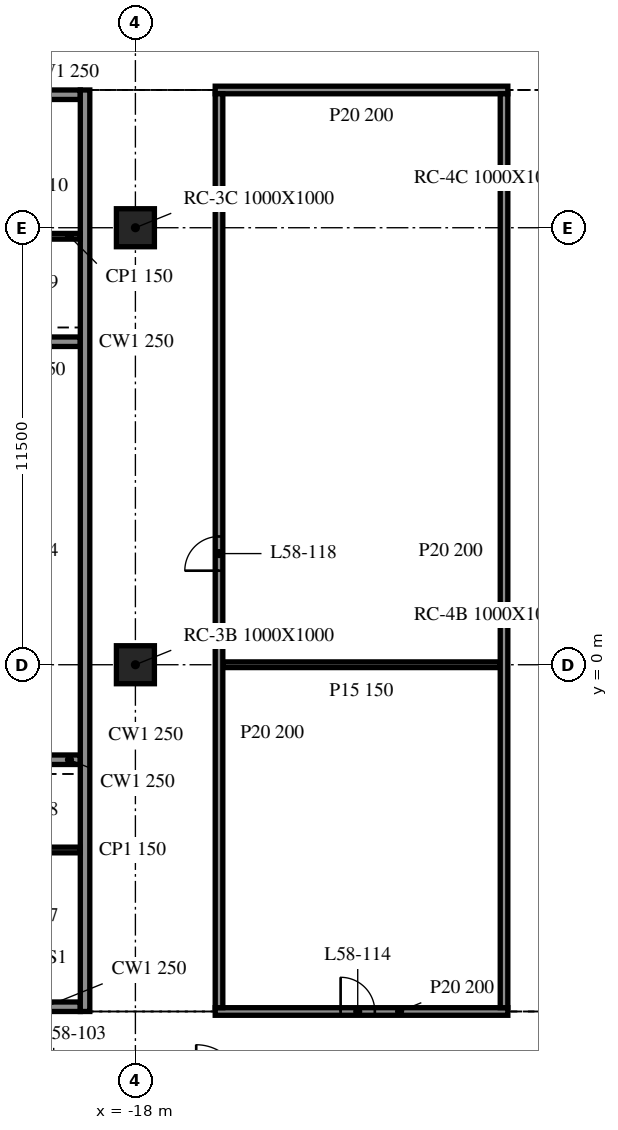
"""IFC4 building model, lengths in metres.
Left out: names, types, materials, properties, quantities, classifications, styles, units other than length and angle.
Written with IfcOpenShell. Run it as: python <this file> out.ifc"""

import sys

from ifc_helpers import new_model, si_unit, direction, frame, frame_2d, origin, origin_2d, place, context, subcontext, project, spatial, rectangle, extrude, element, fill, save


model = new_model("IFC4")
c1 = context("Model", 3, precision=1e-05, world=origin(), true_north=direction((0.0, 1.0)))
c2 = subcontext(c1, "Body", "Model", "MODEL_VIEW")
j1 = project(units=[si_unit("LENGTHUNIT", "METRE"), si_unit("PLANEANGLEUNIT", "RADIAN")], contexts=[c1])
p1 = place(None, origin())
s1 = spatial("IfcSite", under=j1, at=p1, CompositionType="ELEMENT")
p2 = place(p1, origin())
s2 = spatial("IfcBuilding", under=s1, at=p2, CompositionType="ELEMENT")
p3 = place(p2, frame((0.0, 0.0, 240.0)))
s3 = spatial("IfcBuildingStorey", under=s2, at=p3, CompositionType="ELEMENT", Elevation=240.0)
for number, where, z_axis, x_axis in (
    (1, (-18.0, 0.0, -0.34), (0.0, 0.0, 1.0), (1.0, 0.0, 0.0)),
    (2, (-18.0, 11.5, -0.34), (0.0, 0.0, 1.0), (1.0, 0.0, 0.0)),
):
    element("IfcColumn", number, at=place(p3, frame(where, z_axis=z_axis, x_axis=x_axis)), inside=s3, PredefinedType="COLUMN", context=c2, shape_type="SweptSolid", body=[
        extrude(rectangle(XDim=1.0, YDim=1.0, at=origin_2d()), origin(), (0.0, 0.0, 1.0), 3.8),
    ])
p4 = place(p3, frame((-19.325, -9.125, 0.0), z_axis=(0.0, 0.0, 1.0), x_axis=(0.0, 1.0, 0.0)))
e3 = element("IfcWall", 3, at=p4, inside=s3, PredefinedType="SOLIDWALL", context=c2, shape_type="SweptSolid", body=[
    extrude(rectangle(XDim=24.25, YDim=0.25, at=frame_2d((12.125, 0.0))), origin(), (0.0, 0.0, 1.0), 3.46),
])
p5 = place(p3, frame((-19.45, -9.0, 0.0), z_axis=(0.0, 0.0, 1.0), x_axis=(-1.0, 0.0, 0.0)))
e4 = element("IfcWall", 4, at=p5, inside=s3, PredefinedType="SOLIDWALL", context=c2, shape_type="SweptSolid", body=[
    extrude(rectangle(XDim=9.1, YDim=0.25, at=frame_2d((4.55, 0.0))), origin(), (0.0, 0.0, 1.0), 3.46),
])
p6 = place(p5, frame((3.65, 0.0, 0.0)))
e5 = element("IfcOpeningElement", 5, at=p6, cuts=e4, PredefinedType="OPENING", context=c2, shape_type="SweptSolid", body=[
    extrude(rectangle(XDim=1.8, YDim=2.1, at=frame_2d((0.9, 1.05))), frame((0.0, 0.135, 0.0), z_axis=(0.0, -1.0, 0.0), x_axis=(1.0, 0.0, 0.0)), (0.0, 0.0, 1.0), 0.27),
])
p7 = place(p3, frame((-28.55, 15.0, 0.0), z_axis=(0.0, 0.0, 1.0), x_axis=(1.0, 0.0, 0.0)))
e6 = element("IfcWall", 6, at=p7, inside=s3, PredefinedType="SOLIDWALL", context=c2, shape_type="SweptSolid", body=[
    extrude(rectangle(XDim=9.1, YDim=0.25, at=frame_2d((4.55, 0.0))), origin(), (0.0, 0.0, 1.0), 3.46),
])
p8 = place(p7, frame((3.65, 0.0, 0.0)))
e7 = element("IfcOpeningElement", 7, at=p8, cuts=e6, PredefinedType="OPENING", context=c2, shape_type="SweptSolid", body=[
    extrude(rectangle(XDim=1.8, YDim=2.1, at=frame_2d((0.9, 1.05))), frame((0.0, 0.135, 0.0), z_axis=(0.0, -1.0, 0.0), x_axis=(1.0, 0.0, 0.0)), (0.0, 0.0, 1.0), 0.27),
])
for number, where, z_axis, x_axis in (
    (8, (-22.3, -2.5, 0.0), (0.0, 0.0, 1.0), (1.0, 0.0, 0.0)),
    (9, (-22.3, 8.5, 0.0), (0.0, 0.0, 1.0), (1.0, 0.0, 0.0)),
):
    element("IfcWall", number, at=place(p3, frame(where, z_axis=z_axis, x_axis=x_axis)), inside=s3, PredefinedType="SOLIDWALL", context=c2, shape_type="SweptSolid", body=[
        extrude(rectangle(XDim=2.85, YDim=0.25, at=frame_2d((1.425, 0.0))), origin(), (0.0, 0.0, 1.0), 3.46),
    ])
for number, where, z_axis, x_axis in (
    (10, (-22.3, -4.875, 0.0), (0.0, 0.0, 1.0), (1.0, 0.0, 0.0)),
    (11, (-22.3, 11.275, 0.0), (0.0, 0.0, 1.0), (1.0, 0.0, 0.0)),
):
    element("IfcWall", number, at=place(p3, frame(where, z_axis=z_axis, x_axis=x_axis)), inside=s3, PredefinedType="PARTITIONING", context=c2, shape_type="SweptSolid", body=[
        extrude(rectangle(XDim=2.85, YDim=0.15, at=frame_2d((1.425, 0.0))), origin(), (0.0, 0.0, 1.0), 3.46),
    ])
p9 = place(p3, frame((-15.9, -9.125, 0.0), z_axis=(0.0, 0.0, 1.0), x_axis=(1.0, 0.0, 0.0)))
e12 = element("IfcWall", 12, at=p9, inside=s3, PredefinedType="PARTITIONING", context=c2, shape_type="SweptSolid", body=[
    extrude(rectangle(XDim=7.7, YDim=0.2, at=frame_2d((3.85, 0.0))), origin(), (0.0, 0.0, 1.0), 3.46),
])
p10 = place(p9, frame((3.3, 0.0, 0.0)))
e13 = element("IfcOpeningElement", 13, at=p10, cuts=e12, PredefinedType="OPENING", context=c2, shape_type="SweptSolid", body=[
    extrude(rectangle(XDim=0.9, YDim=2.1, at=frame_2d((0.45, 1.05))), frame((0.0, 0.11, 0.0), z_axis=(0.0, -1.0, 0.0), x_axis=(1.0, 0.0, 0.0)), (0.0, 0.0, 1.0), 0.22),
])
p11 = place(p3, frame((-15.7, 0.0, 0.0), z_axis=(0.0, 0.0, 1.0), x_axis=(1.0, 0.0, 0.0)))
e14 = element("IfcWall", 14, at=p11, inside=s3, PredefinedType="PARTITIONING", context=c2, shape_type="SweptSolid", body=[
    extrude(rectangle(XDim=7.3, YDim=0.15, at=frame_2d((3.65, 0.0))), origin(), (0.0, 0.0, 1.0), 3.46),
])
p12 = place(p3, frame((-15.9, 15.125, 0.0), z_axis=(0.0, 0.0, 1.0), x_axis=(1.0, 0.0, 0.0)))
e15 = element("IfcWall", 15, at=p12, inside=s3, PredefinedType="PARTITIONING", context=c2, shape_type="SweptSolid", body=[
    extrude(rectangle(XDim=7.7, YDim=0.2, at=frame_2d((3.85, 0.0))), origin(), (0.0, 0.0, 1.0), 3.46),
])
p13 = place(p3, frame((-15.8, -9.025, 0.0), z_axis=(0.0, 0.0, 1.0), x_axis=(0.0, 1.0, 0.0)))
e16 = element("IfcWall", 16, at=p13, inside=s3, PredefinedType="PARTITIONING", context=c2, shape_type="SweptSolid", body=[
    extrude(rectangle(XDim=24.05, YDim=0.2, at=frame_2d((12.025, 0.0))), origin(), (0.0, 0.0, 1.0), 3.46),
])
p14 = place(p13, frame((11.5, 0.0, 0.0)))
e17 = element("IfcOpeningElement", 17, at=p14, cuts=e16, PredefinedType="OPENING", context=c2, shape_type="SweptSolid", body=[
    extrude(rectangle(XDim=0.9, YDim=2.1, at=frame_2d((0.45, 1.05))), frame((0.0, 0.11, 0.0), z_axis=(0.0, -1.0, 0.0), x_axis=(1.0, 0.0, 0.0)), (0.0, 0.0, 1.0), 0.22),
])
p15 = place(p3, frame((-8.3, -9.025, 0.0), z_axis=(0.0, 0.0, 1.0), x_axis=(0.0, 1.0, 0.0)))
e18 = element("IfcWall", 18, at=p15, inside=s3, PredefinedType="PARTITIONING", context=c2, shape_type="SweptSolid", body=[
    extrude(rectangle(XDim=24.05, YDim=0.2, at=frame_2d((12.025, 0.0))), origin(), (0.0, 0.0, 1.0), 3.46),
])
p16 = place(p10, origin())
e19 = element("IfcDoor", 19, at=p16, inside=s3, OperationType="SINGLE_SWING_LEFT", PredefinedType="DOOR", context=c2, shape_type="SweptSolid", body=[
    extrude(rectangle(XDim=0.9, YDim=2.1, at=frame_2d((0.45, 1.05))), frame((0.0, 0.025, 0.0), z_axis=(0.0, -1.0, 0.0), x_axis=(1.0, 0.0, 0.0)), (0.0, 0.0, 1.0), 0.05),
])
fill(e13, e19)
p17 = place(p14, origin())
e20 = element("IfcDoor", 20, at=p17, inside=s3, OperationType="SINGLE_SWING_RIGHT", PredefinedType="DOOR", context=c2, shape_type="SweptSolid", body=[
    extrude(rectangle(XDim=0.9, YDim=2.1, at=frame_2d((0.45, 1.05))), frame((0.0, 0.025, 0.0), z_axis=(0.0, -1.0, 0.0), x_axis=(1.0, 0.0, 0.0)), (0.0, 0.0, 1.0), 0.05),
])
fill(e17, e20)
save(model, sys.argv[1])
